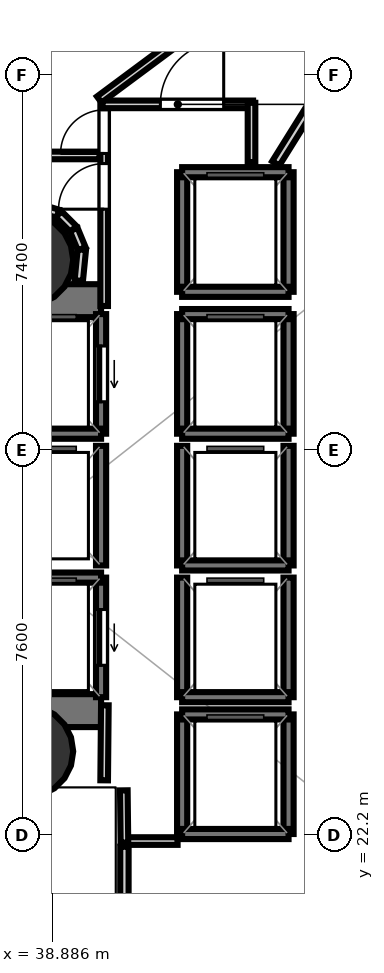
"""IFC4 building model, lengths in metres.
Left out: names, types, materials, properties, quantities, classifications, styles, units other than length and angle.
Written with IfcOpenShell. Run it as: python <this file> out.ifc"""

import sys

from ifc_helpers import new_model, si_unit, direction, frame, frame_2d, origin, origin_2d, place, context, subcontext, project, spatial, rectangle, hollow_circle, extrude, element, fill, save


model = new_model("IFC4")
c1 = context("Model", 3, precision=1e-05, world=origin(), true_north=direction((0.0, 1.0)))
c2 = subcontext(c1, "Body", "Model", "MODEL_VIEW")
j1 = project(units=[si_unit("LENGTHUNIT", "METRE"), si_unit("PLANEANGLEUNIT", "RADIAN")], contexts=[c1])
p1 = place(None, origin())
s1 = spatial("IfcSite", under=j1, at=p1, CompositionType="ELEMENT")
p2 = place(p1, origin())
s2 = spatial("IfcBuilding", under=s1, at=p2, CompositionType="ELEMENT")
p3 = place(p2, frame((0.0, 0.0, 25.7)))
s3 = spatial("IfcBuildingStorey", under=s2, at=p3, CompositionType="ELEMENT", Elevation=25.7)
p4 = place(p3, frame((29.13, 32.745, 0.0), z_axis=(0.0, 0.0, 1.0), x_axis=(1.0, 0.0, 0.0)))
e1 = element("IfcWall", 1, at=p4, inside=s3, PredefinedType="SHEAR", context=c2, shape_type="SweptSolid", body=[
    extrude(rectangle(XDim=10.72, YDim=0.65, at=frame_2d((5.36, 0.0))), origin(), (0.0, 0.0, 1.0), 3.52),
])
p5 = place(p4, frame((1.095, 0.0, 0.0)))
e2 = element("IfcOpeningElement", 2, at=p5, cuts=e1, PredefinedType="OPENING", context=c2, shape_type="SweptSolid", body=[
    extrude(rectangle(XDim=1.25, YDim=2.15, at=frame_2d((0.625, 1.075))), frame((0.0, 0.335, 0.0), z_axis=(0.0, -1.0, 0.0), x_axis=(1.0, 0.0, 0.0)), (0.0, 0.0, 1.0), 0.67),
])
p6 = place(p3, frame((29.13, 24.655, 0.0), z_axis=(0.0, 0.0, 1.0), x_axis=(1.0, 0.0, 0.0)))
e3 = element("IfcWall", 3, at=p6, inside=s3, PredefinedType="SHEAR", context=c2, shape_type="SweptSolid", body=[
    extrude(rectangle(XDim=10.72, YDim=0.65, at=frame_2d((5.36, 0.0))), origin(), (0.0, 0.0, 1.0), 3.52),
])
p7 = place(p6, frame((0.895, 0.0, 0.0)))
e4 = element("IfcOpeningElement", 4, at=p7, cuts=e3, PredefinedType="OPENING", context=c2, shape_type="SweptSolid", body=[
    extrude(rectangle(XDim=1.25, YDim=2.15, at=frame_2d((0.625, 1.075))), frame((0.0, 0.335, 0.0), z_axis=(0.0, -1.0, 0.0), x_axis=(1.0, 0.0, 0.0)), (0.0, 0.0, 1.0), 0.67),
])
for number, where, z_axis, x_axis in (
    (5, (38.4, 33.55, 0.0), (0.0, 0.0, 1.0), (1.0, 0.0, 0.0)),
    (6, (38.4, 23.85, 0.0), (0.0, 0.0, 1.0), (1.0, 0.0, 0.0)),
):
    element("IfcColumn", number, at=place(p3, frame(where, z_axis=z_axis, x_axis=x_axis)), inside=s3, PredefinedType="COLUMN", context=c2, shape_type="SweptSolid", body=[
        extrude(hollow_circle(Radius=0.9, WallThickness=0.045, at=origin_2d()), origin(), (0.0, 0.0, 1.0), 3.7),
    ])
p8 = place(p3, frame((39.85, 30.12, 0.0), z_axis=(0.0, 0.0, 1.0), x_axis=(0.0, 1.0, 0.0)))
e7 = element("IfcWall", 7, at=p8, inside=s3, PredefinedType="SOLIDWALL", context=c2, shape_type="SweptSolid", body=[
    extrude(rectangle(XDim=2.36, YDim=0.2, at=frame_2d((1.18, 0.0))), origin(), (0.0, 0.0, 1.0), 3.52),
])
p9 = place(p8, frame((0.63, 0.0, 0.0)))
e8 = element("IfcOpeningElement", 8, at=p9, cuts=e7, PredefinedType="OPENING", context=c2, shape_type="SweptSolid", body=[
    extrude(rectangle(XDim=1.1, YDim=2.15, at=frame_2d((0.55, 1.075))), frame((0.0, 0.11, 0.0), z_axis=(0.0, -1.0, 0.0), x_axis=(1.0, 0.0, 0.0)), (0.0, 0.0, 1.0), 0.22),
])
p10 = place(p3, frame((37.75, 30.12, 0.0), z_axis=(0.0, 0.0, 1.0), x_axis=(1.0, 0.0, 0.0)))
e9 = element("IfcWall", 9, at=p10, inside=s3, PredefinedType="SOLIDWALL", context=c2, shape_type="SweptSolid", body=[
    extrude(rectangle(XDim=2.1, YDim=0.2, at=frame_2d((1.05, 0.0))), origin(), (0.0, 0.0, 1.0), 3.52),
])
p11 = place(p3, frame((39.85, 24.92, 0.0), z_axis=(0.0, 0.0, 1.0), x_axis=(0.0, 1.0, 0.0)))
e10 = element("IfcWall", 10, at=p11, inside=s3, PredefinedType="SOLIDWALL", context=c2, shape_type="SweptSolid", body=[
    extrude(rectangle(XDim=2.36, YDim=0.2, at=frame_2d((1.18, 0.0))), origin(), (0.0, 0.0, 1.0), 3.52),
])
p12 = place(p11, frame((0.63, 0.0, 0.0)))
e11 = element("IfcOpeningElement", 11, at=p12, cuts=e10, PredefinedType="OPENING", context=c2, shape_type="SweptSolid", body=[
    extrude(rectangle(XDim=1.1, YDim=2.15, at=frame_2d((0.55, 1.075))), frame((0.0, 0.11, 0.0), z_axis=(0.0, -1.0, 0.0), x_axis=(1.0, 0.0, 0.0)), (0.0, 0.0, 1.0), 0.22),
])
p13 = place(p3, frame((37.75, 27.28, 0.0), z_axis=(0.0, 0.0, 1.0), x_axis=(1.0, 0.0, 0.0)))
e12 = element("IfcWall", 12, at=p13, inside=s3, PredefinedType="SOLIDWALL", context=c2, shape_type="SweptSolid", body=[
    extrude(rectangle(XDim=2.1, YDim=0.2, at=frame_2d((1.05, 0.0))), origin(), (0.0, 0.0, 1.0), 3.52),
])
for number, where, z_axis, x_axis in (
    (13, (43.55, 30.12, 0.0), (0.0, 0.0, 1.0), (0.0, 1.0, 0.0)),
    (14, (41.45, 30.12, 0.0), (0.0, 0.0, 1.0), (0.0, 1.0, 0.0)),
):
    element("IfcWall", number, at=place(p3, frame(where, z_axis=z_axis, x_axis=x_axis)), inside=s3, PredefinedType="SOLIDWALL", context=c2, shape_type="SweptSolid", body=[
        extrude(rectangle(XDim=2.36, YDim=0.2, at=frame_2d((1.18, 0.0))), origin(), (0.0, 0.0, 1.0), 3.52),
    ])
for number, where, z_axis, x_axis in (
    (15, (41.45, 32.48, 0.0), (0.0, 0.0, 1.0), (1.0, 0.0, 0.0)),
    (16, (41.45, 30.12, 0.0), (0.0, 0.0, 1.0), (1.0, 0.0, 0.0)),
):
    element("IfcWall", number, at=place(p3, frame(where, z_axis=z_axis, x_axis=x_axis)), inside=s3, PredefinedType="SOLIDWALL", context=c2, shape_type="SweptSolid", body=[
        extrude(rectangle(XDim=2.1, YDim=0.2, at=frame_2d((1.05, 0.0))), origin(), (0.0, 0.0, 1.0), 3.52),
    ])
for number, where, z_axis, x_axis in (
    (17, (43.55, 27.52, 0.0), (0.0, 0.0, 1.0), (0.0, 1.0, 0.0)),
    (18, (41.45, 27.52, 0.0), (0.0, 0.0, 1.0), (0.0, 1.0, 0.0)),
):
    element("IfcWall", number, at=place(p3, frame(where, z_axis=z_axis, x_axis=x_axis)), inside=s3, PredefinedType="SOLIDWALL", context=c2, shape_type="SweptSolid", body=[
        extrude(rectangle(XDim=2.36, YDim=0.2, at=frame_2d((1.18, 0.0))), origin(), (0.0, 0.0, 1.0), 3.52),
    ])
p14 = place(p3, frame((41.45, 27.52, 0.0), z_axis=(0.0, 0.0, 1.0), x_axis=(1.0, 0.0, 0.0)))
e19 = element("IfcWall", 19, at=p14, inside=s3, PredefinedType="SOLIDWALL", context=c2, shape_type="SweptSolid", body=[
    extrude(rectangle(XDim=2.1, YDim=0.2, at=frame_2d((1.05, 0.0))), origin(), (0.0, 0.0, 1.0), 3.52),
])
for number, where, z_axis, x_axis in (
    (20, (43.55, 24.92, 0.0), (0.0, 0.0, 1.0), (0.0, 1.0, 0.0)),
    (21, (41.45, 24.92, 0.0), (0.0, 0.0, 1.0), (0.0, 1.0, 0.0)),
):
    element("IfcWall", number, at=place(p3, frame(where, z_axis=z_axis, x_axis=x_axis)), inside=s3, PredefinedType="SOLIDWALL", context=c2, shape_type="SweptSolid", body=[
        extrude(rectangle(XDim=2.36, YDim=0.2, at=frame_2d((1.18, 0.0))), origin(), (0.0, 0.0, 1.0), 3.52),
    ])
p15 = place(p3, frame((41.45, 24.92, 0.0), z_axis=(0.0, 0.0, 1.0), x_axis=(1.0, 0.0, 0.0)))
e22 = element("IfcWall", 22, at=p15, inside=s3, PredefinedType="SOLIDWALL", context=c2, shape_type="SweptSolid", body=[
    extrude(rectangle(XDim=2.1, YDim=0.2, at=frame_2d((1.05, 0.0))), origin(), (0.0, 0.0, 1.0), 3.52),
])
p16 = place(p3, frame((39.85, 27.52, 0.0), z_axis=(0.0, 0.0, 1.0), x_axis=(0.0, 1.0, 0.0)))
e23 = element("IfcWall", 23, at=p16, inside=s3, PredefinedType="SOLIDWALL", context=c2, shape_type="SweptSolid", body=[
    extrude(rectangle(XDim=2.36, YDim=0.2, at=frame_2d((1.18, 0.0))), origin(), (0.0, 0.0, 1.0), 3.52),
])
for number, where, z_axis, x_axis in (
    (24, (43.55, 22.22, 0.0), (0.0, 0.0, 1.0), (0.0, 1.0, 0.0)),
    (25, (41.45, 22.22, 0.0), (0.0, 0.0, 1.0), (0.0, 1.0, 0.0)),
):
    element("IfcWall", number, at=place(p3, frame(where, z_axis=z_axis, x_axis=x_axis)), inside=s3, PredefinedType="SOLIDWALL", context=c2, shape_type="SweptSolid", body=[
        extrude(rectangle(XDim=2.36, YDim=0.2, at=frame_2d((1.18, 0.0))), origin(), (0.0, 0.0, 1.0), 3.52),
    ])
for number, where, z_axis, x_axis in (
    (26, (41.45, 24.58, 0.0), (0.0, 0.0, 1.0), (1.0, 0.0, 0.0)),
    (27, (41.45, 22.22, 0.0), (0.0, 0.0, 1.0), (1.0, 0.0, 0.0)),
):
    element("IfcWall", number, at=place(p3, frame(where, z_axis=z_axis, x_axis=x_axis)), inside=s3, PredefinedType="SOLIDWALL", context=c2, shape_type="SweptSolid", body=[
        extrude(rectangle(XDim=2.1, YDim=0.2, at=frame_2d((1.05, 0.0))), origin(), (0.0, 0.0, 1.0), 3.52),
    ])
for number, where, z_axis, x_axis in (
    (28, (43.55, 32.92, 0.0), (0.0, 0.0, 1.0), (0.0, 1.0, 0.0)),
    (29, (41.45, 32.92, 0.0), (0.0, 0.0, 1.0), (0.0, 1.0, 0.0)),
):
    element("IfcWall", number, at=place(p3, frame(where, z_axis=z_axis, x_axis=x_axis)), inside=s3, PredefinedType="SOLIDWALL", context=c2, shape_type="SweptSolid", body=[
        extrude(rectangle(XDim=2.36, YDim=0.2, at=frame_2d((1.18, 0.0))), origin(), (0.0, 0.0, 1.0), 3.52),
    ])
for number, where, z_axis, x_axis in (
    (30, (41.45, 35.28, 0.0), (0.0, 0.0, 1.0), (1.0, 0.0, 0.0)),
    (31, (41.45, 32.92, 0.0), (0.0, 0.0, 1.0), (1.0, 0.0, 0.0)),
):
    element("IfcWall", number, at=place(p3, frame(where, z_axis=z_axis, x_axis=x_axis)), inside=s3, PredefinedType="SOLIDWALL", context=c2, shape_type="SweptSolid", body=[
        extrude(rectangle(XDim=2.1, YDim=0.2, at=frame_2d((1.05, 0.0))), origin(), (0.0, 0.0, 1.0), 3.52),
    ])
p17 = place(p3, frame((39.911, 32.64, 0.0), z_axis=(0.0, 0.0, 1.0), x_axis=(0.0, 1.0, 0.0)))
e32 = element("IfcWall", 32, at=p17, inside=s3, PredefinedType="PARTITIONING", context=c2, shape_type="SweptSolid", body=[
    extrude(rectangle(XDim=4.01, YDim=0.15, at=frame_2d((2.005, 0.0))), origin(), (0.0, 0.0, 1.0), 2.84),
])
p18 = place(p17, frame((3.01, 0.0, 0.0)))
e33 = element("IfcOpeningElement", 33, at=p18, cuts=e32, PredefinedType="OPENING", context=c2, shape_type="SweptSolid", body=[
    extrude(rectangle(XDim=0.86, YDim=2.05, at=frame_2d((0.43, 1.025))), frame((0.0, 0.085, 0.0), z_axis=(0.0, -1.0, 0.0), x_axis=(1.0, 0.0, 0.0)), (0.0, 0.0, 1.0), 0.17),
])
p19 = place(p17, frame((1.91, 0.0, 0.0)))
e34 = element("IfcOpeningElement", 34, at=p19, cuts=e32, PredefinedType="OPENING", context=c2, shape_type="SweptSolid", body=[
    extrude(rectangle(XDim=0.9, YDim=2.1, at=frame_2d((0.45, 1.05))), frame((0.0, 0.085, 0.0), z_axis=(0.0, -1.0, 0.0), x_axis=(1.0, 0.0, 0.0)), (0.0, 0.0, 1.0), 0.17),
])
p20 = place(p3, frame((39.88, 36.619, 0.0), z_axis=(0.0, 0.0, 1.0), x_axis=(1.0, 0.0, 0.0)))
e35 = element("IfcWall", 35, at=p20, inside=s3, PredefinedType="PARTITIONING", context=c2, shape_type="SweptSolid", body=[
    extrude(rectangle(XDim=2.97, YDim=0.15, at=frame_2d((1.485, 0.0))), origin(), (0.0, 0.0, 1.0), 2.84),
])
p21 = place(p20, frame((1.14, 0.0, 0.0)))
e36 = element("IfcOpeningElement", 36, at=p21, cuts=e35, PredefinedType="OPENING", context=c2, shape_type="SweptSolid", body=[
    extrude(rectangle(XDim=1.25, YDim=2.2, at=frame_2d((0.625, 1.1))), frame((0.0, 0.085, 0.0), z_axis=(0.0, -1.0, 0.0), x_axis=(1.0, 0.0, 0.0)), (0.0, 0.0, 1.0), 0.17),
])
p22 = place(p3, frame((42.819, 36.65, 0.0), z_axis=(0.0, 0.0, 1.0), x_axis=(0.0, -1.0, 0.0)))
e37 = element("IfcWall", 37, at=p22, inside=s3, PredefinedType="PARTITIONING", context=c2, shape_type="SweptSolid", body=[
    extrude(rectangle(XDim=1.17, YDim=0.15, at=frame_2d((0.585, 0.0))), origin(), (0.0, 0.0, 1.0), 2.84),
])
p23 = place(p3, frame((41.36, 22.081, 0.0), z_axis=(0.0, 0.0, 1.0), x_axis=(-1.0, 0.0, 0.0)))
e38 = element("IfcWall", 38, at=p23, inside=s3, PredefinedType="PARTITIONING", context=c2, shape_type="SweptSolid", body=[
    extrude(rectangle(XDim=1.08, YDim=0.15, at=frame_2d((0.54, 0.0))), origin(), (0.0, 0.0, 1.0), 2.84),
])
p24 = place(p3, frame((40.311, 22.05, 0.0), z_axis=(0.0, 0.0, 1.0), x_axis=(-0.011836292006, 0.999929948642, 0.0)))
e39 = element("IfcWall", 39, at=p24, inside=s3, PredefinedType="PARTITIONING", context=c2, shape_type="SweptSolid", body=[
    extrude(rectangle(XDim=1.031, YDim=0.15, at=frame_2d((0.516, 0.0))), origin(), (0.0, 0.0, 1.0), 2.84),
])
p25 = place(p3, frame((39.911, 23.28, 0.0), z_axis=(0.0, 0.0, 1.0), x_axis=(0.009397771291, 0.999955839972, 0.0)))
e40 = element("IfcWall", 40, at=p25, inside=s3, PredefinedType="PARTITIONING", context=c2, shape_type="SweptSolid", body=[
    extrude(rectangle(XDim=1.481, YDim=0.15, at=frame_2d((0.74, 0.0))), origin(), (0.0, 0.0, 1.0), 2.84),
])
p26 = place(p3, frame((42.185, 38.475, 0.0), z_axis=(0.0, 0.0, 1.0), x_axis=(-0.802818467394, -0.596223538961, 0.0)))
e41 = element("IfcWall", 41, at=p26, inside=s3, PredefinedType="PARTITIONING", context=c2, shape_type="SweptSolid", body=[
    extrude(rectangle(XDim=2.953, YDim=0.15, at=frame_2d((1.477, 0.0))), origin(), (0.0, 0.0, 1.0), 2.798),
])
p27 = place(p3, frame((39.818, 35.611, 0.0), z_axis=(0.0, 0.0, 1.0), x_axis=(-1.0, 0.0, 0.0)))
e42 = element("IfcWall", 42, at=p27, inside=s3, PredefinedType="PARTITIONING", context=c2, shape_type="SweptSolid", body=[
    extrude(rectangle(XDim=2.768, YDim=0.15, at=frame_2d((1.384, 0.0))), origin(), (0.0, 0.0, 1.0), 2.84),
])
p28 = place(p3, frame((40.31, 17.972, 0.0), z_axis=(0.0, 0.0, 1.0), x_axis=(0.000305362145, 0.999999953377, 0.0)))
e43 = element("IfcWall", 43, at=p28, inside=s3, PredefinedType="PLUMBINGWALL", context=c2, shape_type="SweptSolid", body=[
    extrude(rectangle(XDim=3.998, YDim=0.165, at=frame_2d((1.999, 0.0))), origin(), (0.0, 0.0, 1.0), 2.84),
])
p29 = place(p3, frame((43.297, 35.453, 0.0), z_axis=(0.0, 0.0, 1.0), x_axis=(0.529177490016, 0.848511157298, 0.0)))
e44 = element("IfcWall", 44, at=p29, inside=s3, PredefinedType="PLUMBINGWALL", context=c2, shape_type="SweptSolid", body=[
    extrude(rectangle(XDim=3.474, YDim=0.165, at=frame_2d((1.737, 0.0))), origin(), (0.0, 0.0, 1.0), 2.798),
])
p30 = place(p3, frame((39.41, 33.141, 0.0), z_axis=(0.0, 0.0, 1.0), x_axis=(0.09797199107, 0.995189172452, 0.0)))
e45 = element("IfcWall", 45, at=p30, inside=s3, PredefinedType="PLUMBINGWALL", context=c2, shape_type="SweptSolid", body=[
    extrude(rectangle(XDim=0.615, YDim=0.165, at=frame_2d((0.308, 0.0))), origin(), (0.0, 0.0, 1.0), 2.84),
])
for number, where, z_axis, x_axis in (
    (46, (39.468, 33.769, 0.0), (0.0, 0.0, 1.0), (-0.383, 0.924, 0.0)),
    (47, (39.303, 34.161, 0.0), (0.0, 0.0, 1.0), (-0.707, 0.707, 0.0)),
):
    element("IfcWall", number, at=place(p3, frame(where, z_axis=z_axis, x_axis=x_axis)), inside=s3, PredefinedType="PLUMBINGWALL", context=c2, shape_type="SweptSolid", body=[
        extrude(rectangle(XDim=0.414, YDim=0.165, at=frame_2d((0.207, 0.0))), origin(), (0.0, 0.0, 1.0), 2.84),
    ])
p31 = place(p3, frame((38.998, 34.461, 0.0), z_axis=(0.0, 0.0, 1.0), x_axis=(-0.956904203315, 0.290403763195, 0.0)))
e48 = element("IfcWall", 48, at=p31, inside=s3, PredefinedType="PLUMBINGWALL", context=c2, shape_type="SweptSolid", body=[
    extrude(rectangle(XDim=0.615, YDim=0.165, at=frame_2d((0.308, 0.0))), origin(), (0.0, 0.0, 1.0), 2.84),
])
p32 = place(p9, origin())
e49 = element("IfcDoor", 49, at=p32, inside=s3, OperationType="SLIDING_TO_LEFT", PredefinedType="DOOR", context=c2, shape_type="SweptSolid", body=[
    extrude(rectangle(XDim=1.1, YDim=2.15, at=frame_2d((0.55, 1.075))), frame((0.0, 0.025, 0.0), z_axis=(0.0, -1.0, 0.0), x_axis=(1.0, 0.0, 0.0)), (0.0, 0.0, 1.0), 0.05),
])
fill(e8, e49)
p33 = place(p12, origin())
e50 = element("IfcDoor", 50, at=p33, inside=s3, OperationType="SLIDING_TO_LEFT", PredefinedType="DOOR", context=c2, shape_type="SweptSolid", body=[
    extrude(rectangle(XDim=1.1, YDim=2.15, at=frame_2d((0.55, 1.075))), frame((0.0, 0.025, 0.0), z_axis=(0.0, -1.0, 0.0), x_axis=(1.0, 0.0, 0.0)), (0.0, 0.0, 1.0), 0.05),
])
fill(e11, e50)
p34 = place(p18, origin())
e51 = element("IfcDoor", 51, at=p34, inside=s3, OperationType="SINGLE_SWING_LEFT", PredefinedType="DOOR", context=c2, shape_type="SweptSolid", body=[
    extrude(rectangle(XDim=0.86, YDim=2.05, at=frame_2d((0.43, 1.025))), frame((0.0, 0.025, 0.0), z_axis=(0.0, -1.0, 0.0), x_axis=(1.0, 0.0, 0.0)), (0.0, 0.0, 1.0), 0.05),
])
fill(e33, e51)
p35 = place(p19, origin())
e52 = element("IfcDoor", 52, at=p35, inside=s3, OperationType="SINGLE_SWING_LEFT", PredefinedType="DOOR", context=c2, shape_type="SweptSolid", body=[
    extrude(rectangle(XDim=0.9, YDim=2.1, at=frame_2d((0.45, 1.05))), frame((0.0, 0.025, 0.0), z_axis=(0.0, -1.0, 0.0), x_axis=(1.0, 0.0, 0.0)), (0.0, 0.0, 1.0), 0.05),
])
fill(e34, e52)
p36 = place(p21, origin())
e53 = element("IfcDoor", 53, at=p36, inside=s3, OperationType="SINGLE_SWING_RIGHT", PredefinedType="DOOR", context=c2, shape_type="SweptSolid", body=[
    extrude(rectangle(XDim=1.25, YDim=2.2, at=frame_2d((0.625, 1.1))), frame((0.0, 0.025, 0.0), z_axis=(0.0, -1.0, 0.0), x_axis=(1.0, 0.0, 0.0)), (0.0, 0.0, 1.0), 0.05),
])
fill(e36, e53)
save(model, sys.argv[1])
